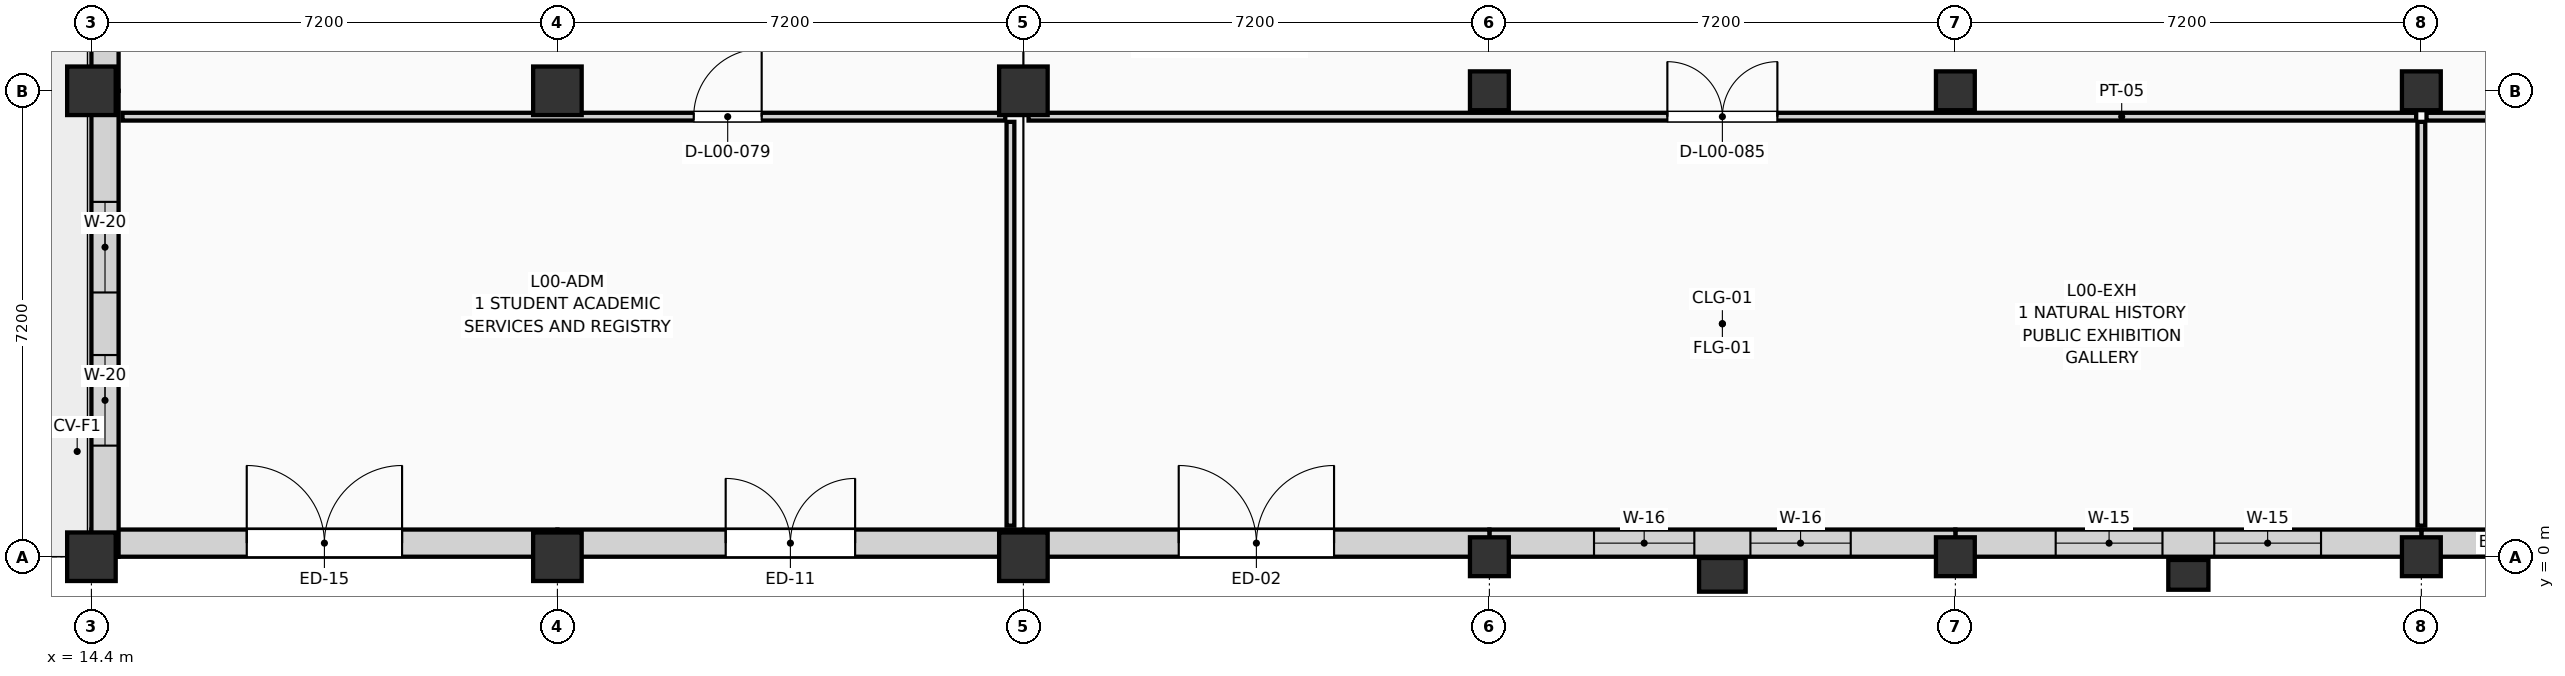
"""IFC4 building model, lengths in metres.
Left out: names, types, materials, properties, quantities, classifications, styles, units other than length and angle.
Written with IfcOpenShell. Run it as: python <this file> out.ifc"""

import sys

from ifc_helpers import new_model, si_unit, direction, frame, frame_2d, origin, origin_2d, place, context, subcontext, project, spatial, rectangle, extrude, element, fill, save


model = new_model("IFC4")
c1 = context("Model", 3, precision=1e-05, world=origin(), true_north=direction((0.0, 1.0)))
c2 = subcontext(c1, "Body", "Model", "MODEL_VIEW")
j1 = project(units=[si_unit("LENGTHUNIT", "METRE"), si_unit("PLANEANGLEUNIT", "RADIAN")], contexts=[c1])
p1 = place(None, origin())
s1 = spatial("IfcSite", under=j1, at=p1, CompositionType="ELEMENT")
p2 = place(p1, origin())
s2 = spatial("IfcBuilding", under=s1, at=p2, CompositionType="ELEMENT")
p3 = place(p2, origin())
s3 = spatial("IfcBuildingStorey", under=s2, at=p3, CompositionType="ELEMENT", Elevation=0.0)
for number, where, z_axis, x_axis in (
    (1, (14.4, 0.0, 0.0), (0.0, 0.0, 1.0), (1.0, 0.0, 0.0)),
    (2, (14.4, 7.2, 0.0), (0.0, 0.0, 1.0), (1.0, 0.0, 0.0)),
    (3, (21.6, 0.0, 0.0), (0.0, 0.0, 1.0), (1.0, 0.0, 0.0)),
    (4, (21.6, 7.2, 0.0), (0.0, 0.0, 1.0), (1.0, 0.0, 0.0)),
    (5, (28.8, 0.0, 0.0), (0.0, 0.0, 1.0), (1.0, 0.0, 0.0)),
    (6, (28.8, 7.2, 0.0), (0.0, 0.0, 1.0), (1.0, 0.0, 0.0)),
):
    element("IfcColumn", number, at=place(p3, frame(where, z_axis=z_axis, x_axis=x_axis)), inside=s3, PredefinedType="COLUMN", context=c2, shape_type="SweptSolid", body=[
        extrude(rectangle(XDim=0.75, YDim=0.75, at=origin_2d()), origin(), (0.0, 0.0, 1.0), 4.5),
    ])
for number, where, z_axis, x_axis in (
    (7, (36.0, 0.0, 0.0), (0.0, 0.0, 1.0), (1.0, 0.0, 0.0)),
    (8, (36.0, 7.2, 0.0), (0.0, 0.0, 1.0), (1.0, 0.0, 0.0)),
    (9, (43.2, 0.0, 0.0), (0.0, 0.0, 1.0), (1.0, 0.0, 0.0)),
    (10, (43.2, 7.2, 0.0), (0.0, 0.0, 1.0), (1.0, 0.0, 0.0)),
    (11, (50.4, 0.0, 0.0), (0.0, 0.0, 1.0), (1.0, 0.0, 0.0)),
    (12, (50.4, 7.2, 0.0), (0.0, 0.0, 1.0), (1.0, 0.0, 0.0)),
):
    element("IfcColumn", number, at=place(p3, frame(where, z_axis=z_axis, x_axis=x_axis)), inside=s3, PredefinedType="COLUMN", context=c2, shape_type="SweptSolid", body=[
        extrude(rectangle(XDim=0.6, YDim=0.6, at=origin_2d()), origin(), (0.0, 0.0, 1.0), 4.5),
    ])
p4 = place(p3, frame((39.6, -0.28, 0.0), z_axis=(0.0, 0.0, 1.0), x_axis=(0.0, 1.0, 0.0)))
e13 = element("IfcColumn", 13, at=p4, inside=s3, PredefinedType="PILASTER", context=c2, shape_type="SweptSolid", body=[
    extrude(rectangle(XDim=0.52, YDim=0.72, at=origin_2d()), origin(), (0.0, 0.0, 1.0), 4.5),
])
p5 = place(p3, frame((46.8, -0.28, 0.0), z_axis=(0.0, 0.0, 1.0), x_axis=(0.0, 1.0, 0.0)))
e14 = element("IfcColumn", 14, at=p5, inside=s3, PredefinedType="PILASTER", context=c2, shape_type="SweptSolid", body=[
    extrude(rectangle(XDim=0.46, YDim=0.62, at=origin_2d()), origin(), (0.0, 0.0, 1.0), 4.5),
])
p6 = place(p3, frame((50.4, 0.21, 0.0), z_axis=(0.0, 0.0, 1.0), x_axis=(1.0, 0.0, 0.0)))
e15 = element("IfcWall", 15, at=p6, inside=s3, PredefinedType="SOLIDWALL", context=c2, shape_type="SweptSolid", body=[
    extrude(rectangle(XDim=7.2, YDim=0.42, at=frame_2d((3.6, 0.0))), origin(), (0.0, 0.0, 1.0), 3.62),
])
p7 = place(p6, frame((2.6, 0.0, 0.0)))
e16 = element("IfcOpeningElement", 16, at=p7, cuts=e15, PredefinedType="OPENING", context=c2, shape_type="SweptSolid", body=[
    extrude(rectangle(XDim=2.0, YDim=2.4, at=frame_2d((1.0, 1.2))), frame((0.0, 0.222, 0.0), z_axis=(0.0, -1.0, 0.0), x_axis=(1.0, 0.0, 0.0)), (0.0, 0.0, 1.0), 0.444),
])
p8 = place(p3, frame((43.2, 0.21, 0.0), z_axis=(0.0, 0.0, 1.0), x_axis=(1.0, 0.0, 0.0)))
e17 = element("IfcWall", 17, at=p8, inside=s3, PredefinedType="SOLIDWALL", context=c2, shape_type="SweptSolid", body=[
    extrude(rectangle(XDim=7.2, YDim=0.42, at=frame_2d((3.6, 0.0))), origin(), (0.0, 0.0, 1.0), 3.62),
])
p9 = place(p8, frame((1.55, 0.0, 0.45)))
e18 = element("IfcOpeningElement", 18, at=p9, cuts=e17, PredefinedType="OPENING", context=c2, shape_type="SweptSolid", body=[
    extrude(rectangle(XDim=1.65, YDim=2.6, at=frame_2d((0.825, 1.3))), frame((0.0, 0.222, 0.0), z_axis=(0.0, -1.0, 0.0), x_axis=(1.0, 0.0, 0.0)), (0.0, 0.0, 1.0), 0.444),
])
p10 = place(p8, frame((4.0, 0.0, 0.45)))
e19 = element("IfcOpeningElement", 19, at=p10, cuts=e17, PredefinedType="OPENING", context=c2, shape_type="SweptSolid", body=[
    extrude(rectangle(XDim=1.65, YDim=2.6, at=frame_2d((0.825, 1.3))), frame((0.0, 0.222, 0.0), z_axis=(0.0, -1.0, 0.0), x_axis=(1.0, 0.0, 0.0)), (0.0, 0.0, 1.0), 0.444),
])
p11 = place(p3, frame((36.0, 0.21, 0.0), z_axis=(0.0, 0.0, 1.0), x_axis=(1.0, 0.0, 0.0)))
e20 = element("IfcWall", 20, at=p11, inside=s3, PredefinedType="SOLIDWALL", context=c2, shape_type="SweptSolid", body=[
    extrude(rectangle(XDim=7.2, YDim=0.42, at=frame_2d((3.6, 0.0))), origin(), (0.0, 0.0, 1.0), 3.62),
])
p12 = place(p11, frame((1.617, 0.0, 0.45)))
e21 = element("IfcOpeningElement", 21, at=p12, cuts=e20, PredefinedType="OPENING", context=c2, shape_type="SweptSolid", body=[
    extrude(rectangle(XDim=1.55, YDim=2.55, at=frame_2d((0.775, 1.275))), frame((0.0, 0.222, 0.0), z_axis=(0.0, -1.0, 0.0), x_axis=(1.0, 0.0, 0.0)), (0.0, 0.0, 1.0), 0.444),
])
p13 = place(p11, frame((4.033, 0.0, 0.45)))
e22 = element("IfcOpeningElement", 22, at=p13, cuts=e20, PredefinedType="OPENING", context=c2, shape_type="SweptSolid", body=[
    extrude(rectangle(XDim=1.55, YDim=2.55, at=frame_2d((0.775, 1.275))), frame((0.0, 0.222, 0.0), z_axis=(0.0, -1.0, 0.0), x_axis=(1.0, 0.0, 0.0)), (0.0, 0.0, 1.0), 0.444),
])
p14 = place(p3, frame((28.8, 0.21, 0.0), z_axis=(0.0, 0.0, 1.0), x_axis=(1.0, 0.0, 0.0)))
e23 = element("IfcWall", 23, at=p14, inside=s3, PredefinedType="SOLIDWALL", context=c2, shape_type="SweptSolid", body=[
    extrude(rectangle(XDim=7.2, YDim=0.42, at=frame_2d((3.6, 0.0))), origin(), (0.0, 0.0, 1.0), 3.62),
])
p15 = place(p14, frame((2.4, 0.0, 0.0)))
e24 = element("IfcOpeningElement", 24, at=p15, cuts=e23, PredefinedType="OPENING", context=c2, shape_type="SweptSolid", body=[
    extrude(rectangle(XDim=2.4, YDim=2.6, at=frame_2d((1.2, 1.3))), frame((0.0, 0.222, 0.0), z_axis=(0.0, -1.0, 0.0), x_axis=(1.0, 0.0, 0.0)), (0.0, 0.0, 1.0), 0.444),
])
p16 = place(p3, frame((21.6, 0.21, 0.0), z_axis=(0.0, 0.0, 1.0), x_axis=(1.0, 0.0, 0.0)))
e25 = element("IfcWall", 25, at=p16, inside=s3, PredefinedType="SOLIDWALL", context=c2, shape_type="SweptSolid", body=[
    extrude(rectangle(XDim=7.2, YDim=0.42, at=frame_2d((3.6, 0.0))), origin(), (0.0, 0.0, 1.0), 3.62),
])
p17 = place(p16, frame((2.6, 0.0, 0.0)))
e26 = element("IfcOpeningElement", 26, at=p17, cuts=e25, PredefinedType="OPENING", context=c2, shape_type="SweptSolid", body=[
    extrude(rectangle(XDim=2.0, YDim=2.4, at=frame_2d((1.0, 1.2))), frame((0.0, 0.222, 0.0), z_axis=(0.0, -1.0, 0.0), x_axis=(1.0, 0.0, 0.0)), (0.0, 0.0, 1.0), 0.444),
])
p18 = place(p3, frame((14.4, 0.21, 0.0), z_axis=(0.0, 0.0, 1.0), x_axis=(1.0, 0.0, 0.0)))
e27 = element("IfcWall", 27, at=p18, inside=s3, PredefinedType="SOLIDWALL", context=c2, shape_type="SweptSolid", body=[
    extrude(rectangle(XDim=7.2, YDim=0.42, at=frame_2d((3.6, 0.0))), origin(), (0.0, 0.0, 1.0), 3.62),
])
p19 = place(p18, frame((2.4, 0.0, 0.0)))
e28 = element("IfcOpeningElement", 28, at=p19, cuts=e27, PredefinedType="OPENING", context=c2, shape_type="SweptSolid", body=[
    extrude(rectangle(XDim=2.4, YDim=2.6, at=frame_2d((1.2, 1.3))), frame((0.0, 0.222, 0.0), z_axis=(0.0, -1.0, 0.0), x_axis=(1.0, 0.0, 0.0)), (0.0, 0.0, 1.0), 0.444),
])
p20 = place(p3, frame((14.61, 0.0, 0.0), z_axis=(0.0, 0.0, 1.0), x_axis=(0.0, 1.0, 0.0)))
e29 = element("IfcWall", 29, at=p20, inside=s3, PredefinedType="SOLIDWALL", context=c2, shape_type="SweptSolid", body=[
    extrude(rectangle(XDim=7.2, YDim=0.42, at=frame_2d((3.6, 0.0))), origin(), (0.0, 0.0, 1.0), 3.62),
])
p21 = place(p20, frame((1.717, 0.0, 0.45)))
e30 = element("IfcOpeningElement", 30, at=p21, cuts=e29, PredefinedType="OPENING", context=c2, shape_type="SweptSolid", body=[
    extrude(rectangle(XDim=1.4, YDim=2.38, at=frame_2d((0.7, 1.19))), frame((0.0, 0.222, 0.0), z_axis=(0.0, -1.0, 0.0), x_axis=(1.0, 0.0, 0.0)), (0.0, 0.0, 1.0), 0.444),
])
p22 = place(p20, frame((4.083, 0.0, 0.45)))
e31 = element("IfcOpeningElement", 31, at=p22, cuts=e29, PredefinedType="OPENING", context=c2, shape_type="SweptSolid", body=[
    extrude(rectangle(XDim=1.4, YDim=2.38, at=frame_2d((0.7, 1.19))), frame((0.0, 0.222, 0.0), z_axis=(0.0, -1.0, 0.0), x_axis=(1.0, 0.0, 0.0)), (0.0, 0.0, 1.0), 0.444),
])
p23 = place(p3, frame((14.61, 7.2, 0.0), z_axis=(0.0, 0.0, 1.0), x_axis=(0.0, 1.0, 0.0)))
e32 = element("IfcWall", 32, at=p23, inside=s3, PredefinedType="SOLIDWALL", context=c2, shape_type="SweptSolid", body=[
    extrude(rectangle(XDim=7.2, YDim=0.42, at=frame_2d((3.6, 0.0))), origin(), (0.0, 0.0, 1.0), 3.62),
])
p24 = place(p23, frame((1.783, 0.0, 0.45)))
e33 = element("IfcOpeningElement", 33, at=p24, cuts=e32, PredefinedType="OPENING", context=c2, shape_type="SweptSolid", body=[
    extrude(rectangle(XDim=1.3, YDim=2.35, at=frame_2d((0.65, 1.175))), frame((0.0, 0.222, 0.0), z_axis=(0.0, -1.0, 0.0), x_axis=(1.0, 0.0, 0.0)), (0.0, 0.0, 1.0), 0.444),
])
p25 = place(p23, frame((4.117, 0.0, 0.45)))
e34 = element("IfcOpeningElement", 34, at=p25, cuts=e32, PredefinedType="OPENING", context=c2, shape_type="SweptSolid", body=[
    extrude(rectangle(XDim=1.3, YDim=2.35, at=frame_2d((0.65, 1.175))), frame((0.0, 0.222, 0.0), z_axis=(0.0, -1.0, 0.0), x_axis=(1.0, 0.0, 0.0)), (0.0, 0.0, 1.0), 0.444),
])
p26 = place(p3, frame((28.6, 0.48, 0.0), z_axis=(0.0, 0.0, 1.0), x_axis=(0.0, 1.0, 0.0)))
e35 = element("IfcWall", 35, at=p26, inside=s3, PredefinedType="PARTITIONING", context=c2, shape_type="SweptSolid", body=[
    extrude(rectangle(XDim=6.24, YDim=0.12, at=frame_2d((3.12, 0.0))), origin(), (0.0, 0.0, 1.0), 3.385),
])
p27 = place(p3, frame((14.88, 6.8, 0.0), z_axis=(0.0, 0.0, 1.0), x_axis=(1.0, 0.0, 0.0)))
e36 = element("IfcWall", 36, at=p27, inside=s3, PredefinedType="PARTITIONING", context=c2, shape_type="SweptSolid", body=[
    extrude(rectangle(XDim=13.64, YDim=0.12, at=frame_2d((6.82, 0.0))), origin(), (0.0, 0.0, 1.0), 3.485),
])
p28 = place(p27, frame((8.826, 0.0, 0.0)))
e37 = element("IfcOpeningElement", 37, at=p28, cuts=e36, PredefinedType="OPENING", context=c2, shape_type="SweptSolid", body=[
    extrude(rectangle(XDim=1.05, YDim=2.18, at=frame_2d((0.525, 1.09))), frame((0.0, 0.072, 0.0), z_axis=(0.0, -1.0, 0.0), x_axis=(1.0, 0.0, 0.0)), (0.0, 0.0, 1.0), 0.144),
])
p29 = place(p3, frame((50.4, 0.48, 0.0), z_axis=(0.0, 0.0, 1.0), x_axis=(0.0, 1.0, 0.0)))
e38 = element("IfcWall", 38, at=p29, inside=s3, PredefinedType="PARTITIONING", context=c2, shape_type="SweptSolid", body=[
    extrude(rectangle(XDim=6.24, YDim=0.12, at=frame_2d((3.12, 0.0))), origin(), (0.0, 0.0, 1.0), 3.385),
])
p30 = place(p3, frame((28.88, 6.8, 0.0), z_axis=(0.0, 0.0, 1.0), x_axis=(1.0, 0.0, 0.0)))
e39 = element("IfcWall", 39, at=p30, inside=s3, PredefinedType="PARTITIONING", context=c2, shape_type="SweptSolid", body=[
    extrude(rectangle(XDim=21.44, YDim=0.12, at=frame_2d((10.72, 0.0))), origin(), (0.0, 0.0, 1.0), 3.485),
])
p31 = place(p30, frame((9.87, 0.0, 0.0)))
e40 = element("IfcOpeningElement", 40, at=p31, cuts=e39, PredefinedType="OPENING", context=c2, shape_type="SweptSolid", body=[
    extrude(rectangle(XDim=1.7, YDim=2.28, at=frame_2d((0.85, 1.14))), frame((0.0, 0.072, 0.0), z_axis=(0.0, -1.0, 0.0), x_axis=(1.0, 0.0, 0.0)), (0.0, 0.0, 1.0), 0.144),
])
p32 = place(p3, frame((50.48, 6.8, 0.0), z_axis=(0.0, 0.0, 1.0), x_axis=(1.0, 0.0, 0.0)))
e41 = element("IfcWall", 41, at=p32, inside=s3, PredefinedType="PARTITIONING", context=c2, shape_type="SweptSolid", body=[
    extrude(rectangle(XDim=13.84, YDim=0.12, at=frame_2d((6.92, 0.0))), origin(), (0.0, 0.0, 1.0), 3.485),
])
p33 = place(p32, frame((3.633, 0.0, 0.0)))
e42 = element("IfcOpeningElement", 42, at=p33, cuts=e41, PredefinedType="OPENING", context=c2, shape_type="SweptSolid", body=[
    extrude(rectangle(XDim=1.7, YDim=2.28, at=frame_2d((0.85, 1.14))), frame((0.0, 0.072, 0.0), z_axis=(0.0, -1.0, 0.0), x_axis=(1.0, 0.0, 0.0)), (0.0, 0.0, 1.0), 0.144),
])
p34 = place(p9, origin())
e43 = element("IfcWindow", 43, at=p34, inside=s3, PartitioningType="SINGLE_PANEL", PredefinedType="WINDOW", context=c2, shape_type="SweptSolid", body=[
    extrude(rectangle(XDim=1.65, YDim=2.6, at=frame_2d((0.825, 1.3))), frame((0.0, 0.03, 0.0), z_axis=(0.0, -1.0, 0.0), x_axis=(1.0, 0.0, 0.0)), (0.0, 0.0, 1.0), 0.06),
])
fill(e18, e43)
p35 = place(p10, origin())
e44 = element("IfcWindow", 44, at=p35, inside=s3, PartitioningType="SINGLE_PANEL", PredefinedType="WINDOW", context=c2, shape_type="SweptSolid", body=[
    extrude(rectangle(XDim=1.65, YDim=2.6, at=frame_2d((0.825, 1.3))), frame((0.0, 0.03, 0.0), z_axis=(0.0, -1.0, 0.0), x_axis=(1.0, 0.0, 0.0)), (0.0, 0.0, 1.0), 0.06),
])
fill(e19, e44)
p36 = place(p12, origin())
e45 = element("IfcWindow", 45, at=p36, inside=s3, PartitioningType="SINGLE_PANEL", PredefinedType="WINDOW", context=c2, shape_type="SweptSolid", body=[
    extrude(rectangle(XDim=1.55, YDim=2.55, at=frame_2d((0.775, 1.275))), frame((0.0, 0.03, 0.0), z_axis=(0.0, -1.0, 0.0), x_axis=(1.0, 0.0, 0.0)), (0.0, 0.0, 1.0), 0.06),
])
fill(e21, e45)
p37 = place(p13, origin())
e46 = element("IfcWindow", 46, at=p37, inside=s3, PartitioningType="SINGLE_PANEL", PredefinedType="WINDOW", context=c2, shape_type="SweptSolid", body=[
    extrude(rectangle(XDim=1.55, YDim=2.55, at=frame_2d((0.775, 1.275))), frame((0.0, 0.03, 0.0), z_axis=(0.0, -1.0, 0.0), x_axis=(1.0, 0.0, 0.0)), (0.0, 0.0, 1.0), 0.06),
])
fill(e22, e46)
p38 = place(p15, origin())
e47 = element("IfcDoor", 47, at=p38, inside=s3, OperationType="DOUBLE_DOOR_SINGLE_SWING", PredefinedType="DOOR", context=c2, shape_type="SweptSolid", body=[
    extrude(rectangle(XDim=2.4, YDim=2.6, at=frame_2d((1.2, 1.3))), frame((0.0, 0.025, 0.0), z_axis=(0.0, -1.0, 0.0), x_axis=(1.0, 0.0, 0.0)), (0.0, 0.0, 1.0), 0.05),
])
fill(e24, e47)
p39 = place(p17, origin())
e48 = element("IfcDoor", 48, at=p39, inside=s3, OperationType="DOUBLE_DOOR_SINGLE_SWING", PredefinedType="DOOR", context=c2, shape_type="SweptSolid", body=[
    extrude(rectangle(XDim=2.0, YDim=2.4, at=frame_2d((1.0, 1.2))), frame((0.0, 0.025, 0.0), z_axis=(0.0, -1.0, 0.0), x_axis=(1.0, 0.0, 0.0)), (0.0, 0.0, 1.0), 0.05),
])
fill(e26, e48)
p40 = place(p19, origin())
e49 = element("IfcDoor", 49, at=p40, inside=s3, OperationType="DOUBLE_DOOR_SINGLE_SWING", PredefinedType="DOOR", context=c2, shape_type="SweptSolid", body=[
    extrude(rectangle(XDim=2.4, YDim=2.6, at=frame_2d((1.2, 1.3))), frame((0.0, 0.025, 0.0), z_axis=(0.0, -1.0, 0.0), x_axis=(1.0, 0.0, 0.0)), (0.0, 0.0, 1.0), 0.05),
])
fill(e28, e49)
p41 = place(p21, origin())
e50 = element("IfcWindow", 50, at=p41, inside=s3, PartitioningType="SINGLE_PANEL", PredefinedType="WINDOW", context=c2, shape_type="SweptSolid", body=[
    extrude(rectangle(XDim=1.4, YDim=2.38, at=frame_2d((0.7, 1.19))), frame((0.0, 0.03, 0.0), z_axis=(0.0, -1.0, 0.0), x_axis=(1.0, 0.0, 0.0)), (0.0, 0.0, 1.0), 0.06),
])
fill(e30, e50)
p42 = place(p22, origin())
e51 = element("IfcWindow", 51, at=p42, inside=s3, PartitioningType="SINGLE_PANEL", PredefinedType="WINDOW", context=c2, shape_type="SweptSolid", body=[
    extrude(rectangle(XDim=1.4, YDim=2.38, at=frame_2d((0.7, 1.19))), frame((0.0, 0.03, 0.0), z_axis=(0.0, -1.0, 0.0), x_axis=(1.0, 0.0, 0.0)), (0.0, 0.0, 1.0), 0.06),
])
fill(e31, e51)
p43 = place(p28, origin())
e52 = element("IfcDoor", 52, at=p43, inside=s3, OperationType="SINGLE_SWING_RIGHT", PredefinedType="DOOR", context=c2, shape_type="SweptSolid", body=[
    extrude(rectangle(XDim=1.05, YDim=2.18, at=frame_2d((0.525, 1.09))), frame((0.0, 0.025, 0.0), z_axis=(0.0, -1.0, 0.0), x_axis=(1.0, 0.0, 0.0)), (0.0, 0.0, 1.0), 0.05),
])
fill(e37, e52)
p44 = place(p31, origin())
e53 = element("IfcDoor", 53, at=p44, inside=s3, OperationType="DOUBLE_DOOR_SINGLE_SWING", PredefinedType="DOOR", context=c2, shape_type="SweptSolid", body=[
    extrude(rectangle(XDim=1.7, YDim=2.28, at=frame_2d((0.85, 1.14))), frame((0.0, 0.025, 0.0), z_axis=(0.0, -1.0, 0.0), x_axis=(1.0, 0.0, 0.0)), (0.0, 0.0, 1.0), 0.05),
])
fill(e40, e53)
save(model, sys.argv[1])
